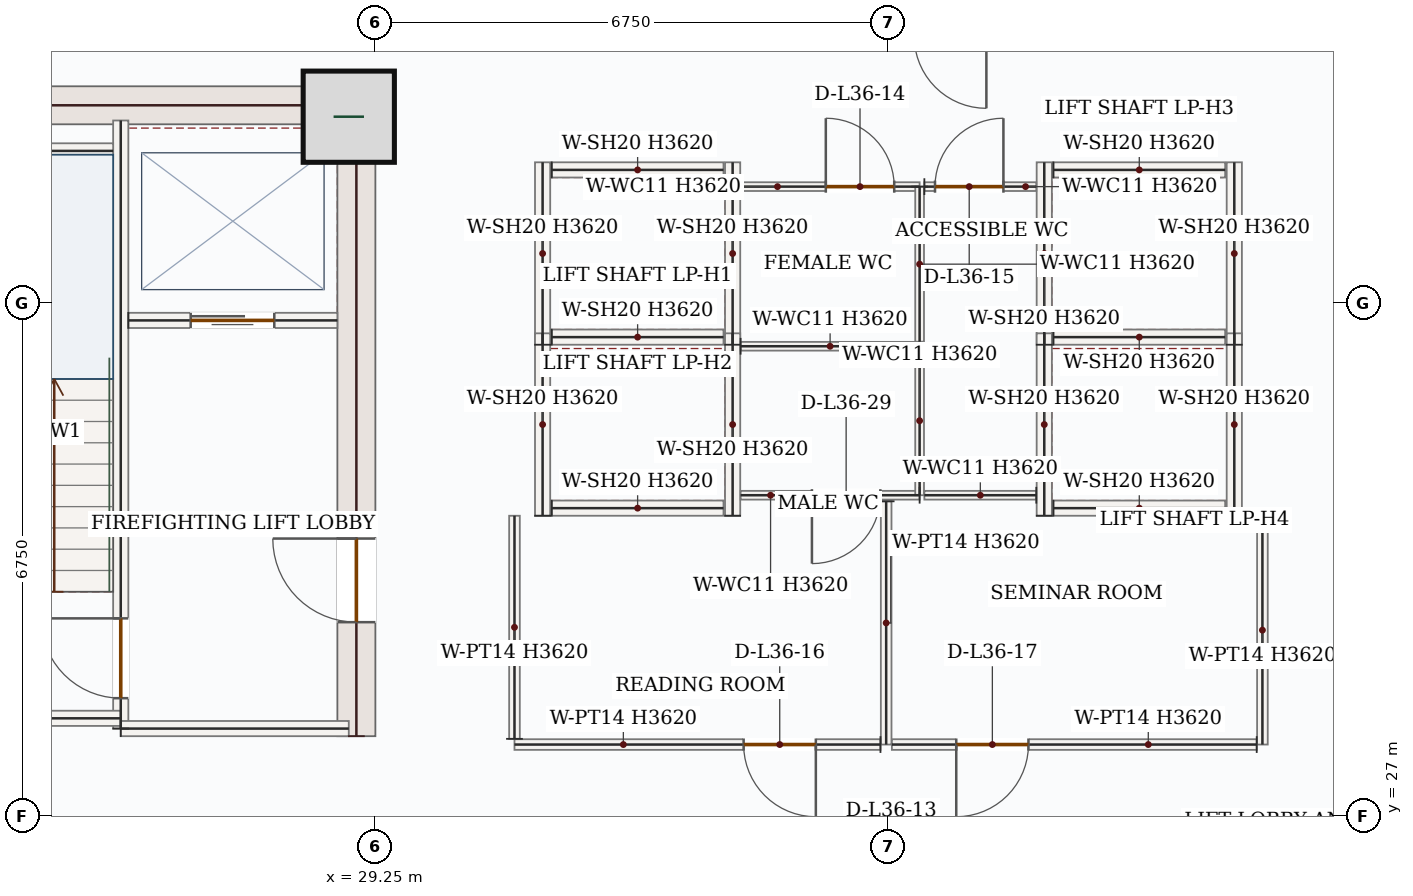
"""IFC4 building model, lengths in metres.
Left out: names, types, materials, properties, quantities, classifications, styles, units other than length and angle.
Written with IfcOpenShell. Run it as: python <this file> out.ifc"""

import sys

from ifc_helpers import new_model, si_unit, direction, frame, frame_2d, origin, origin_2d, place, context, subcontext, project, spatial, rectangle, extrude, source, transform, mapped, element, fill, save


model = new_model("IFC4")
c1 = context("Model", 3, precision=1e-05, world=origin(), true_north=direction((0.0, 1.0)))
c2 = subcontext(c1, "Body", "Model", "MODEL_VIEW")
j1 = project(units=[si_unit("LENGTHUNIT", "METRE"), si_unit("PLANEANGLEUNIT", "RADIAN")], contexts=[c1])
p1 = place(None, origin())
s1 = spatial("IfcSite", under=j1, at=p1, CompositionType="ELEMENT")
p2 = place(p1, origin())
s2 = spatial("IfcBuilding", under=s1, at=p2, CompositionType="ELEMENT")
p3 = place(p2, frame((0.0, 0.0, 159.0)))
s3 = spatial("IfcBuildingStorey", under=s2, at=p3, CompositionType="ELEMENT", Elevation=159.0)
p4 = place(p3, frame((29.0, 28.05, 0.0), z_axis=(0.0, 0.0, 1.0), x_axis=(0.0, 1.0, 0.0)))
e1 = element("IfcWall", 1, at=p4, inside=s3, PredefinedType="SHEAR", context=c2, shape_type="SweptSolid", body=[
    extrude(rectangle(XDim=8.55, YDim=0.5, at=frame_2d((4.275, 0.0))), origin(), (0.0, 0.0, 1.0), 3.62),
])
p5 = place(p4, frame((1.5, 0.0, 0.0)))
e2 = element("IfcOpeningElement", 2, at=p5, cuts=e1, PredefinedType="OPENING", context=c2, shape_type="SweptSolid", body=[
    extrude(rectangle(XDim=1.1, YDim=2.2, at=frame_2d((0.55, 1.1))), frame((0.0, 0.26, 0.0), z_axis=(0.0, -1.0, 0.0), x_axis=(1.0, 0.0, 0.0)), (0.0, 0.0, 1.0), 0.52),
])
m1 = source(origin(), c2, "Body", "SweptSolid", [
    extrude(rectangle(XDim=7.0, YDim=0.5, at=frame_2d((3.5, 0.0))), origin(), (0.0, 0.0, 1.0), 3.62),
])
p6 = place(p3, frame((21.75, 36.35, 0.0), z_axis=(0.0, 0.0, 1.0), x_axis=(1.0, 0.0, 0.0)))
e3 = element("IfcWall", 3, at=p6, inside=s3, PredefinedType="SHEAR", context=c2, shape_type="MappedRepresentation", body=[
    mapped(m1, transform((0.0, 0.0, 0.0), x_axis=(1.0, 0.0, 0.0), y_axis=(0.0, 1.0, 0.0), z_axis=(0.0, 0.0, 1.0), scale=1.0)),
])
m2 = source(origin(), c2, "Body", "SweptSolid", [
    extrude(rectangle(XDim=1.2, YDim=1.2, at=origin_2d()), origin(), (0.0, 0.0, 1.0), 3.9),
])
p7 = place(p3, frame((28.9, 36.2, 0.0), z_axis=(0.0, 0.0, 1.0), x_axis=(1.0, 0.0, 0.0)))
e4 = element("IfcColumn", 4, at=p7, inside=s3, PredefinedType="COLUMN", context=c2, shape_type="MappedRepresentation", body=[
    mapped(m2, transform((0.0, 0.0, 0.0), x_axis=(1.0, 0.0, 0.0), y_axis=(0.0, 1.0, 0.0), z_axis=(0.0, 0.0, 1.0), scale=1.0)),
])
p8 = place(p3, frame((25.9, 28.15, 0.0), z_axis=(0.0, 0.0, 1.0), x_axis=(0.0, 1.0, 0.0)))
e5 = element("IfcWall", 5, at=p8, inside=s3, PredefinedType="SOLIDWALL", context=c2, shape_type="SweptSolid", body=[
    extrude(rectangle(XDim=8.0, YDim=0.2, at=frame_2d((4.0, 0.0))), origin(), (0.0, 0.0, 1.0), 3.62),
])
p9 = place(p8, frame((0.4, 0.0, 0.0)))
e6 = element("IfcOpeningElement", 6, at=p9, cuts=e5, PredefinedType="OPENING", context=c2, shape_type="SweptSolid", body=[
    extrude(rectangle(XDim=1.05, YDim=2.15, at=frame_2d((0.525, 1.075))), frame((0.0, 0.11, 0.0), z_axis=(0.0, -1.0, 0.0), x_axis=(1.0, 0.0, 0.0)), (0.0, 0.0, 1.0), 0.22),
])
m3 = source(origin(), c2, "Body", "SweptSolid", [
    extrude(rectangle(XDim=4.25, YDim=0.2, at=frame_2d((2.125, 0.0))), origin(), (0.0, 0.0, 1.0), 3.62),
])
p10 = place(p3, frame((21.65, 28.285, 0.0), z_axis=(0.0, 0.0, 1.0), x_axis=(1.0, 0.0, 0.0)))
e7 = element("IfcWall", 7, at=p10, inside=s3, PredefinedType="SOLIDWALL", context=c2, shape_type="MappedRepresentation", body=[
    mapped(m3, transform((0.0, 0.0, 0.0), x_axis=(1.0, 0.0, 0.0), y_axis=(0.0, 1.0, 0.0), z_axis=(0.0, 0.0, 1.0), scale=1.0)),
])
m4 = source(origin(), c2, "Body", "SweptSolid", [
    extrude(rectangle(XDim=3.0, YDim=0.2, at=frame_2d((1.5, 0.0))), origin(), (0.0, 0.0, 1.0), 3.62),
])
p11 = place(p3, frame((25.9, 28.15, 0.0), z_axis=(0.0, 0.0, 1.0), x_axis=(1.0, 0.0, 0.0)))
e8 = element("IfcWall", 8, at=p11, inside=s3, PredefinedType="SOLIDWALL", context=c2, shape_type="MappedRepresentation", body=[
    mapped(m4, transform((0.0, 0.0, 0.0), x_axis=(1.0, 0.0, 0.0), y_axis=(0.0, 1.0, 0.0), z_axis=(0.0, 0.0, 1.0), scale=1.0)),
])
m5 = source(origin(), c2, "Body", "SweptSolid", [
    extrude(rectangle(XDim=3.25, YDim=0.2, at=frame_2d((1.625, 0.0))), origin(), (0.0, 0.0, 1.0), 3.62),
])
p12 = place(p3, frame((22.55, 35.75, 0.0), z_axis=(0.0, 0.0, 1.0), x_axis=(1.0, 0.0, 0.0)))
e9 = element("IfcWall", 9, at=p12, inside=s3, PredefinedType="SOLIDWALL", context=c2, shape_type="MappedRepresentation", body=[
    mapped(m5, transform((0.0, 0.0, 0.0), x_axis=(1.0, 0.0, 0.0), y_axis=(0.0, 1.0, 0.0), z_axis=(0.0, 0.0, 1.0), scale=1.0)),
])
p13 = place(p3, frame((26.0, 33.52, 0.0), z_axis=(0.0, 0.0, 1.0), x_axis=(1.0, 0.0, 0.0)))
e10 = element("IfcWall", 10, at=p13, inside=s3, PredefinedType="SOLIDWALL", context=c2, shape_type="SweptSolid", body=[
    extrude(rectangle(XDim=2.75, YDim=0.2, at=frame_2d((1.375, 0.0))), origin(), (0.0, 0.0, 1.0), 3.62),
])
p14 = place(p13, frame((0.82, 0.0, 0.0)))
e11 = element("IfcOpeningElement", 11, at=p14, cuts=e10, PredefinedType="OPENING", context=c2, shape_type="SweptSolid", body=[
    extrude(rectangle(XDim=1.1, YDim=2.15, at=frame_2d((0.55, 1.075))), frame((0.0, 0.11, 0.0), z_axis=(0.0, -1.0, 0.0), x_axis=(1.0, 0.0, 0.0)), (0.0, 0.0, 1.0), 0.22),
])
m6 = source(origin(), c2, "Body", "SweptSolid", [
    extrude(rectangle(XDim=2.4, YDim=0.2, at=frame_2d((1.2, 0.0))), origin(), (0.0, 0.0, 1.0), 3.62),
])
for number, where, z_axis, x_axis in (
    (12, (31.45, 33.2, 0.0), (0.0, 0.0, 1.0), (0.0, 1.0, 0.0)),
    (13, (33.95, 33.2, 0.0), (0.0, 0.0, 1.0), (0.0, 1.0, 0.0)),
):
    element("IfcWall", number, at=place(p3, frame(where, z_axis=z_axis, x_axis=x_axis)), inside=s3, PredefinedType="SOLIDWALL", context=c2, shape_type="MappedRepresentation", body=[
        mapped(m6, transform((0.0, 0.0, 0.0), x_axis=(1.0, 0.0, 0.0), y_axis=(0.0, 1.0, 0.0), z_axis=(0.0, 0.0, 1.0), scale=1.0)),
    ])
m7 = source(origin(), c2, "Body", "SweptSolid", [
    extrude(rectangle(XDim=2.26, YDim=0.2, at=frame_2d((1.13, 0.0))), origin(), (0.0, 0.0, 1.0), 3.62),
])
for number, where, z_axis, x_axis in (
    (14, (31.57, 33.3, 0.0), (0.0, 0.0, 1.0), (1.0, 0.0, 0.0)),
    (15, (31.57, 35.5, 0.0), (0.0, 0.0, 1.0), (1.0, 0.0, 0.0)),
):
    element("IfcWall", number, at=place(p3, frame(where, z_axis=z_axis, x_axis=x_axis)), inside=s3, PredefinedType="SOLIDWALL", context=c2, shape_type="MappedRepresentation", body=[
        mapped(m7, transform((0.0, 0.0, 0.0), x_axis=(1.0, 0.0, 0.0), y_axis=(0.0, 1.0, 0.0), z_axis=(0.0, 0.0, 1.0), scale=1.0)),
    ])
for number, where, z_axis, x_axis in (
    (16, (31.45, 30.95, 0.0), (0.0, 0.0, 1.0), (0.0, 1.0, 0.0)),
    (17, (33.95, 30.95, 0.0), (0.0, 0.0, 1.0), (0.0, 1.0, 0.0)),
):
    element("IfcWall", number, at=place(p3, frame(where, z_axis=z_axis, x_axis=x_axis)), inside=s3, PredefinedType="SOLIDWALL", context=c2, shape_type="MappedRepresentation", body=[
        mapped(m6, transform((0.0, 0.0, 0.0), x_axis=(1.0, 0.0, 0.0), y_axis=(0.0, 1.0, 0.0), z_axis=(0.0, 0.0, 1.0), scale=1.0)),
    ])
p15 = place(p3, frame((31.57, 31.05, 0.0), z_axis=(0.0, 0.0, 1.0), x_axis=(1.0, 0.0, 0.0)))
e18 = element("IfcWall", 18, at=p15, inside=s3, PredefinedType="SOLIDWALL", context=c2, shape_type="MappedRepresentation", body=[
    mapped(m7, transform((0.0, 0.0, 0.0), x_axis=(1.0, 0.0, 0.0), y_axis=(0.0, 1.0, 0.0), z_axis=(0.0, 0.0, 1.0), scale=1.0)),
])
for number, where, z_axis, x_axis in (
    (19, (38.05, 33.2, 0.0), (0.0, 0.0, 1.0), (0.0, 1.0, 0.0)),
    (20, (40.55, 33.2, 0.0), (0.0, 0.0, 1.0), (0.0, 1.0, 0.0)),
):
    element("IfcWall", number, at=place(p3, frame(where, z_axis=z_axis, x_axis=x_axis)), inside=s3, PredefinedType="SOLIDWALL", context=c2, shape_type="MappedRepresentation", body=[
        mapped(m6, transform((0.0, 0.0, 0.0), x_axis=(1.0, 0.0, 0.0), y_axis=(0.0, 1.0, 0.0), z_axis=(0.0, 0.0, 1.0), scale=1.0)),
    ])
for number, where, z_axis, x_axis in (
    (21, (38.17, 33.3, 0.0), (0.0, 0.0, 1.0), (1.0, 0.0, 0.0)),
    (22, (38.17, 35.5, 0.0), (0.0, 0.0, 1.0), (1.0, 0.0, 0.0)),
):
    element("IfcWall", number, at=place(p3, frame(where, z_axis=z_axis, x_axis=x_axis)), inside=s3, PredefinedType="SOLIDWALL", context=c2, shape_type="MappedRepresentation", body=[
        mapped(m7, transform((0.0, 0.0, 0.0), x_axis=(1.0, 0.0, 0.0), y_axis=(0.0, 1.0, 0.0), z_axis=(0.0, 0.0, 1.0), scale=1.0)),
    ])
for number, where, z_axis, x_axis in (
    (23, (38.05, 30.95, 0.0), (0.0, 0.0, 1.0), (0.0, 1.0, 0.0)),
    (24, (40.55, 30.95, 0.0), (0.0, 0.0, 1.0), (0.0, 1.0, 0.0)),
):
    element("IfcWall", number, at=place(p3, frame(where, z_axis=z_axis, x_axis=x_axis)), inside=s3, PredefinedType="SOLIDWALL", context=c2, shape_type="MappedRepresentation", body=[
        mapped(m6, transform((0.0, 0.0, 0.0), x_axis=(1.0, 0.0, 0.0), y_axis=(0.0, 1.0, 0.0), z_axis=(0.0, 0.0, 1.0), scale=1.0)),
    ])
p16 = place(p3, frame((38.17, 31.05, 0.0), z_axis=(0.0, 0.0, 1.0), x_axis=(1.0, 0.0, 0.0)))
e25 = element("IfcWall", 25, at=p16, inside=s3, PredefinedType="SOLIDWALL", context=c2, shape_type="MappedRepresentation", body=[
    mapped(m7, transform((0.0, 0.0, 0.0), x_axis=(1.0, 0.0, 0.0), y_axis=(0.0, 1.0, 0.0), z_axis=(0.0, 0.0, 1.0), scale=1.0)),
])
p17 = place(p3, frame((36.41, 31.22, 0.0), z_axis=(0.0, 0.0, 1.0), x_axis=(-1.0, 0.0, 0.0)))
e26 = element("IfcWall", 26, at=p17, inside=s3, PredefinedType="PARTITIONING", context=c2, shape_type="SweptSolid", body=[
    extrude(rectangle(XDim=2.355, YDim=0.115, at=frame_2d((1.177, 0.0))), origin(), (0.0, 0.0, 1.0), 3.62),
])
p18 = place(p17, frame((0.517, 0.0, 0.0)))
e27 = element("IfcOpeningElement", 27, at=p18, cuts=e26, PredefinedType="OPENING", context=c2, shape_type="SweptSolid", body=[
    extrude(rectangle(XDim=0.9, YDim=2.1, at=frame_2d((0.45, 1.05))), frame((0.0, 0.067, 0.0), z_axis=(0.0, -1.0, 0.0), x_axis=(1.0, 0.0, 0.0)), (0.0, 0.0, 1.0), 0.135),
])
m8 = source(origin(), c2, "Body", "SweptSolid", [
    extrude(rectangle(XDim=2.355, YDim=0.115, at=frame_2d((1.177, 0.0))), origin(), (0.0, 0.0, 1.0), 3.62),
])
p19 = place(p3, frame((34.055, 33.18, 0.0), z_axis=(0.0, 0.0, 1.0), x_axis=(1.0, 0.0, 0.0)))
e28 = element("IfcWall", 28, at=p19, inside=s3, PredefinedType="PARTITIONING", context=c2, shape_type="MappedRepresentation", body=[
    mapped(m8, transform((0.0, 0.0, 0.0), x_axis=(1.0, 0.0, 0.0), y_axis=(0.0, 1.0, 0.0), z_axis=(0.0, 0.0, 1.0), scale=1.0)),
])
m9 = source(origin(), c2, "Body", "SweptSolid", [
    extrude(rectangle(XDim=1.96, YDim=0.115, at=frame_2d((0.98, 0.0))), origin(), (0.0, 0.0, 1.0), 3.62),
])
p20 = place(p3, frame((36.41, 33.18, 0.0), z_axis=(0.0, 0.0, 1.0), x_axis=(0.0, -1.0, 0.0)))
e29 = element("IfcWall", 29, at=p20, inside=s3, PredefinedType="PARTITIONING", context=c2, shape_type="MappedRepresentation", body=[
    mapped(m9, transform((0.0, 0.0, 0.0), x_axis=(1.0, 0.0, 0.0), y_axis=(0.0, 1.0, 0.0), z_axis=(0.0, 0.0, 1.0), scale=1.0)),
])
p21 = place(p3, frame((34.055, 35.28, 0.0), z_axis=(0.0, 0.0, 1.0), x_axis=(1.0, 0.0, 0.0)))
e30 = element("IfcWall", 30, at=p21, inside=s3, PredefinedType="PARTITIONING", context=c2, shape_type="SweptSolid", body=[
    extrude(rectangle(XDim=2.355, YDim=0.115, at=frame_2d((1.177, 0.0))), origin(), (0.0, 0.0, 1.0), 3.62),
])
p22 = place(p21, frame((1.121, 0.0, 0.0)))
e31 = element("IfcOpeningElement", 31, at=p22, cuts=e30, PredefinedType="OPENING", context=c2, shape_type="SweptSolid", body=[
    extrude(rectangle(XDim=0.9, YDim=2.1, at=frame_2d((0.45, 1.05))), frame((0.0, 0.067, 0.0), z_axis=(0.0, -1.0, 0.0), x_axis=(1.0, 0.0, 0.0)), (0.0, 0.0, 1.0), 0.135),
])
m10 = source(origin(), c2, "Body", "SweptSolid", [
    extrude(rectangle(XDim=2.04, YDim=0.115, at=frame_2d((1.02, 0.0))), origin(), (0.0, 0.0, 1.0), 3.62),
])
p23 = place(p3, frame((36.41, 35.28, 0.0), z_axis=(0.0, 0.0, 1.0), x_axis=(0.0, -1.0, 0.0)))
e32 = element("IfcWall", 32, at=p23, inside=s3, PredefinedType="PARTITIONING", context=c2, shape_type="MappedRepresentation", body=[
    mapped(m10, transform((0.0, 0.0, 0.0), x_axis=(1.0, 0.0, 0.0), y_axis=(0.0, 1.0, 0.0), z_axis=(0.0, 0.0, 1.0), scale=1.0)),
])
m11 = source(origin(), c2, "Body", "SweptSolid", [
    extrude(rectangle(XDim=1.473, YDim=0.115, at=frame_2d((0.736, 0.0))), origin(), (0.0, 0.0, 1.0), 3.62),
])
p24 = place(p3, frame((37.945, 31.22, 0.0), z_axis=(0.0, 0.0, 1.0), x_axis=(-1.0, 0.0, 0.0)))
e33 = element("IfcWall", 33, at=p24, inside=s3, PredefinedType="PARTITIONING", context=c2, shape_type="MappedRepresentation", body=[
    mapped(m11, transform((0.0, 0.0, 0.0), x_axis=(1.0, 0.0, 0.0), y_axis=(0.0, 1.0, 0.0), z_axis=(0.0, 0.0, 1.0), scale=1.0)),
])
p25 = place(p3, frame((36.472, 35.28, 0.0), z_axis=(0.0, 0.0, 1.0), x_axis=(1.0, 0.0, 0.0)))
e34 = element("IfcWall", 34, at=p25, inside=s3, PredefinedType="PARTITIONING", context=c2, shape_type="SweptSolid", body=[
    extrude(rectangle(XDim=1.473, YDim=0.115, at=frame_2d((0.736, 0.0))), origin(), (0.0, 0.0, 1.0), 3.62),
])
p26 = place(p25, frame((0.14, 0.0, 0.0)))
e35 = element("IfcOpeningElement", 35, at=p26, cuts=e34, PredefinedType="OPENING", context=c2, shape_type="SweptSolid", body=[
    extrude(rectangle(XDim=0.9, YDim=2.1, at=frame_2d((0.45, 1.05))), frame((0.0, 0.067, 0.0), z_axis=(0.0, -1.0, 0.0), x_axis=(1.0, 0.0, 0.0)), (0.0, 0.0, 1.0), 0.135),
])
m12 = source(origin(), c2, "Body", "SweptSolid", [
    extrude(rectangle(XDim=3.2, YDim=0.14, at=frame_2d((1.6, 0.0))), origin(), (0.0, 0.0, 1.0), 3.62),
])
p27 = place(p3, frame((35.97, 31.14, 0.0), z_axis=(0.0, 0.0, 1.0), x_axis=(0.0, -1.0, 0.0)))
e36 = element("IfcWall", 36, at=p27, inside=s3, PredefinedType="PARTITIONING", context=c2, shape_type="MappedRepresentation", body=[
    mapped(m12, transform((0.0, 0.0, 0.0), x_axis=(1.0, 0.0, 0.0), y_axis=(0.0, 1.0, 0.0), z_axis=(0.0, 0.0, 1.0), scale=1.0)),
])
p28 = place(p3, frame((35.895, 27.94, 0.0), z_axis=(0.0, 0.0, 1.0), x_axis=(-1.0, 0.0, 0.0)))
e37 = element("IfcWall", 37, at=p28, inside=s3, PredefinedType="PARTITIONING", context=c2, shape_type="SweptSolid", body=[
    extrude(rectangle(XDim=4.815, YDim=0.14, at=frame_2d((2.407, 0.0))), origin(), (0.0, 0.0, 1.0), 3.62),
])
p29 = place(p28, frame((0.85, 0.0, 0.0)))
e38 = element("IfcOpeningElement", 38, at=p29, cuts=e37, PredefinedType="OPENING", context=c2, shape_type="SweptSolid", body=[
    extrude(rectangle(XDim=0.95, YDim=2.15, at=frame_2d((0.475, 1.075))), frame((0.0, 0.08, 0.0), z_axis=(0.0, -1.0, 0.0), x_axis=(1.0, 0.0, 0.0)), (0.0, 0.0, 1.0), 0.16),
])
m13 = source(origin(), c2, "Body", "SweptSolid", [
    extrude(rectangle(XDim=2.935, YDim=0.14, at=frame_2d((1.468, 0.0))), origin(), (0.0, 0.0, 1.0), 3.62),
])
p30 = place(p3, frame((31.08, 28.015, 0.0), z_axis=(0.0, 0.0, 1.0), x_axis=(0.0, 1.0, 0.0)))
e39 = element("IfcWall", 39, at=p30, inside=s3, PredefinedType="PARTITIONING", context=c2, shape_type="MappedRepresentation", body=[
    mapped(m13, transform((0.0, 0.0, 0.0), x_axis=(1.0, 0.0, 0.0), y_axis=(0.0, 1.0, 0.0), z_axis=(0.0, 0.0, 1.0), scale=1.0)),
])
m14 = source(origin(), c2, "Body", "SweptSolid", [
    extrude(rectangle(XDim=3.01, YDim=0.14, at=frame_2d((1.505, 0.0))), origin(), (0.0, 0.0, 1.0), 3.62),
])
p31 = place(p3, frame((40.92, 30.95, 0.0), z_axis=(0.0, 0.0, 1.0), x_axis=(0.0, -1.0, 0.0)))
e40 = element("IfcWall", 40, at=p31, inside=s3, PredefinedType="PARTITIONING", context=c2, shape_type="MappedRepresentation", body=[
    mapped(m14, transform((0.0, 0.0, 0.0), x_axis=(1.0, 0.0, 0.0), y_axis=(0.0, 1.0, 0.0), z_axis=(0.0, 0.0, 1.0), scale=1.0)),
])
p32 = place(p3, frame((40.845, 27.94, 0.0), z_axis=(0.0, 0.0, 1.0), x_axis=(-1.0, 0.0, 0.0)))
e41 = element("IfcWall", 41, at=p32, inside=s3, PredefinedType="PARTITIONING", context=c2, shape_type="SweptSolid", body=[
    extrude(rectangle(XDim=4.8, YDim=0.14, at=frame_2d((2.4, 0.0))), origin(), (0.0, 0.0, 1.0), 3.62),
])
p33 = place(p32, frame((3.003, 0.0, 0.0)))
e42 = element("IfcOpeningElement", 42, at=p33, cuts=e41, PredefinedType="OPENING", context=c2, shape_type="SweptSolid", body=[
    extrude(rectangle(XDim=0.95, YDim=2.15, at=frame_2d((0.475, 1.075))), frame((0.0, 0.08, 0.0), z_axis=(0.0, -1.0, 0.0), x_axis=(1.0, 0.0, 0.0)), (0.0, 0.0, 1.0), 0.16),
])
m15 = source(origin(), c2, "Body", "SweptSolid", [
    extrude(rectangle(XDim=1.05, YDim=2.15, at=frame_2d((0.525, 1.075))), frame((0.0, 0.025, 0.0), z_axis=(0.0, -1.0, 0.0), x_axis=(1.0, 0.0, 0.0)), (0.0, 0.0, 1.0), 0.05),
])
p34 = place(p9, origin())
e43 = element("IfcDoor", 43, at=p34, inside=s3, OperationType="SINGLE_SWING_RIGHT", PredefinedType="DOOR", context=c2, shape_type="MappedRepresentation", body=[
    mapped(m15, transform((0.0, 0.0, 0.0), x_axis=(1.0, 0.0, 0.0), y_axis=(0.0, 1.0, 0.0), z_axis=(0.0, 0.0, 1.0), scale=1.0)),
])
fill(e6, e43)
m16 = source(origin(), c2, "Body", "SweptSolid", [
    extrude(rectangle(XDim=1.1, YDim=2.15, at=frame_2d((0.55, 1.075))), frame((0.0, 0.025, 0.0), z_axis=(0.0, -1.0, 0.0), x_axis=(1.0, 0.0, 0.0)), (0.0, 0.0, 1.0), 0.05),
])
p35 = place(p14, origin())
e44 = element("IfcDoor", 44, at=p35, inside=s3, OperationType="DOUBLE_DOOR_SLIDING", PredefinedType="DOOR", context=c2, shape_type="MappedRepresentation", body=[
    mapped(m16, transform((0.0, 0.0, 0.0), x_axis=(1.0, 0.0, 0.0), y_axis=(0.0, 1.0, 0.0), z_axis=(0.0, 0.0, 1.0), scale=1.0)),
])
fill(e11, e44)
m17 = source(origin(), c2, "Body", "SweptSolid", [
    extrude(rectangle(XDim=1.1, YDim=2.2, at=frame_2d((0.55, 1.1))), frame((0.0, 0.025, 0.0), z_axis=(0.0, -1.0, 0.0), x_axis=(1.0, 0.0, 0.0)), (0.0, 0.0, 1.0), 0.05),
])
p36 = place(p5, origin())
e45 = element("IfcDoor", 45, at=p36, inside=s3, OperationType="SINGLE_SWING_RIGHT", PredefinedType="DOOR", context=c2, shape_type="MappedRepresentation", body=[
    mapped(m17, transform((0.0, 0.0, 0.0), x_axis=(1.0, 0.0, 0.0), y_axis=(0.0, 1.0, 0.0), z_axis=(0.0, 0.0, 1.0), scale=1.0)),
])
fill(e2, e45)
m18 = source(origin(), c2, "Body", "SweptSolid", [
    extrude(rectangle(XDim=0.9, YDim=2.1, at=frame_2d((0.45, 1.05))), frame((0.0, 0.025, 0.0), z_axis=(0.0, -1.0, 0.0), x_axis=(1.0, 0.0, 0.0)), (0.0, 0.0, 1.0), 0.05),
])
p37 = place(p22, origin())
e46 = element("IfcDoor", 46, at=p37, inside=s3, OperationType="SINGLE_SWING_LEFT", PredefinedType="DOOR", context=c2, shape_type="MappedRepresentation", body=[
    mapped(m18, transform((0.0, 0.0, 0.0), x_axis=(1.0, 0.0, 0.0), y_axis=(0.0, 1.0, 0.0), z_axis=(0.0, 0.0, 1.0), scale=1.0)),
])
fill(e31, e46)
p38 = place(p26, origin())
e47 = element("IfcDoor", 47, at=p38, inside=s3, OperationType="SINGLE_SWING_RIGHT", PredefinedType="DOOR", context=c2, shape_type="MappedRepresentation", body=[
    mapped(m18, transform((0.0, 0.0, 0.0), x_axis=(1.0, 0.0, 0.0), y_axis=(0.0, 1.0, 0.0), z_axis=(0.0, 0.0, 1.0), scale=1.0)),
])
fill(e35, e47)
m19 = source(origin(), c2, "Body", "SweptSolid", [
    extrude(rectangle(XDim=0.95, YDim=2.15, at=frame_2d((0.475, 1.075))), frame((0.0, 0.025, 0.0), z_axis=(0.0, -1.0, 0.0), x_axis=(1.0, 0.0, 0.0)), (0.0, 0.0, 1.0), 0.05),
])
p39 = place(p29, origin())
e48 = element("IfcDoor", 48, at=p39, inside=s3, OperationType="SINGLE_SWING_LEFT", PredefinedType="DOOR", context=c2, shape_type="MappedRepresentation", body=[
    mapped(m19, transform((0.0, 0.0, 0.0), x_axis=(1.0, 0.0, 0.0), y_axis=(0.0, 1.0, 0.0), z_axis=(0.0, 0.0, 1.0), scale=1.0)),
])
fill(e38, e48)
p40 = place(p33, origin())
e49 = element("IfcDoor", 49, at=p40, inside=s3, OperationType="SINGLE_SWING_RIGHT", PredefinedType="DOOR", context=c2, shape_type="MappedRepresentation", body=[
    mapped(m19, transform((0.0, 0.0, 0.0), x_axis=(1.0, 0.0, 0.0), y_axis=(0.0, 1.0, 0.0), z_axis=(0.0, 0.0, 1.0), scale=1.0)),
])
fill(e42, e49)
p41 = place(p18, origin())
e50 = element("IfcDoor", 50, at=p41, inside=s3, OperationType="SINGLE_SWING_RIGHT", PredefinedType="DOOR", context=c2, shape_type="MappedRepresentation", body=[
    mapped(m18, transform((0.0, 0.0, 0.0), x_axis=(1.0, 0.0, 0.0), y_axis=(0.0, 1.0, 0.0), z_axis=(0.0, 0.0, 1.0), scale=1.0)),
])
fill(e27, e50)
save(model, sys.argv[1])
